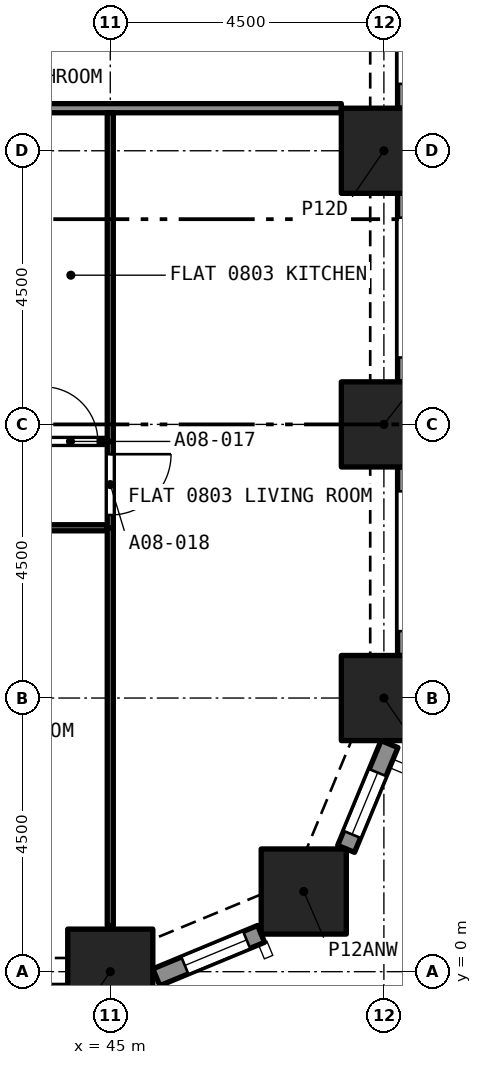
"""IFC4 building model, lengths in metres.
Left out: names, types, materials, properties, quantities, classifications, styles, units other than length and angle.
Written with IfcOpenShell. Run it as: python <this file> out.ifc"""

import sys

from ifc_helpers import new_model, si_unit, direction, frame, frame_2d, origin, origin_2d, place, context, subcontext, project, spatial, rectangle, extrude, element, fill, save


model = new_model("IFC4")
c1 = context("Model", 3, precision=1e-05, world=origin(), true_north=direction((0.0, 1.0)))
c2 = subcontext(c1, "Body", "Model", "MODEL_VIEW")
j1 = project(units=[si_unit("LENGTHUNIT", "METRE"), si_unit("PLANEANGLEUNIT", "RADIAN")], contexts=[c1])
p1 = place(None, origin())
s1 = spatial("IfcSite", under=j1, at=p1, CompositionType="ELEMENT")
p2 = place(p1, origin())
s2 = spatial("IfcBuilding", under=s1, at=p2, CompositionType="ELEMENT")
p3 = place(p2, frame((0.0, 0.0, 36.8)))
s3 = spatial("IfcBuildingStorey", under=s2, at=p3, CompositionType="ELEMENT", Elevation=36.8)
for number, where, z_axis, x_axis in (
    (1, (45.0, 0.0, 0.0), (0.0, 0.0, 1.0), (1.0, 0.0, 0.0)),
    (2, (48.182, 1.318, 0.0), (0.0, 0.0, 1.0), (1.0, 0.0, 0.0)),
    (3, (49.5, 4.5, 0.0), (0.0, 0.0, 1.0), (1.0, 0.0, 0.0)),
    (4, (49.5, 9.0, 0.0), (0.0, 0.0, 1.0), (1.0, 0.0, 0.0)),
    (5, (49.5, 13.5, 0.0), (0.0, 0.0, 1.0), (1.0, 0.0, 0.0)),
):
    element("IfcColumn", number, at=place(p3, frame(where, z_axis=z_axis, x_axis=x_axis)), inside=s3, PredefinedType="COLUMN", context=c2, shape_type="SweptSolid", body=[
        extrude(rectangle(XDim=1.4, YDim=1.4, at=origin_2d()), origin(), (0.0, 0.0, 1.0), 3.2),
    ])
p4 = place(p3, frame((47.48, 0.622, 0.0), z_axis=(0.0, 0.0, 1.0), x_axis=(-0.923903565336, -0.38262540684, 0.0)))
e6 = element("IfcWall", 6, at=p4, inside=s3, PredefinedType="SOLIDWALL", context=c2, shape_type="SweptSolid", body=[
    extrude(rectangle(XDim=1.865, YDim=0.3, at=frame_2d((0.933, 0.0))), origin(), (0.0, 0.0, 1.0), 3.2),
])
p5 = place(p4, frame((0.258, 0.0, 0.45)))
e7 = element("IfcOpeningElement", 7, at=p5, cuts=e6, PredefinedType="OPENING", context=c2, shape_type="SweptSolid", body=[
    extrude(rectangle(XDim=1.1, YDim=1.95, at=frame_2d((0.55, 0.975))), frame((0.0, 0.16, 0.0), z_axis=(0.0, -1.0, 0.0), x_axis=(1.0, 0.0, 0.0)), (0.0, 0.0, 1.0), 0.32),
])
p6 = place(p3, frame((49.592, 3.743, 0.0), z_axis=(0.0, 0.0, 1.0), x_axis=(-0.382737135771, -0.923857286003, 0.0)))
e8 = element("IfcWall", 8, at=p6, inside=s3, PredefinedType="SOLIDWALL", context=c2, shape_type="SweptSolid", body=[
    extrude(rectangle(XDim=1.865, YDim=0.3, at=frame_2d((0.933, 0.0))), origin(), (0.0, 0.0, 1.0), 3.2),
])
p7 = place(p6, frame((0.508, 0.0, 0.45)))
e9 = element("IfcOpeningElement", 9, at=p7, cuts=e8, PredefinedType="OPENING", context=c2, shape_type="SweptSolid", body=[
    extrude(rectangle(XDim=1.1, YDim=1.95, at=frame_2d((0.55, 0.975))), frame((0.0, 0.16, 0.0), z_axis=(0.0, -1.0, 0.0), x_axis=(1.0, 0.0, 0.0)), (0.0, 0.0, 1.0), 0.32),
])
p8 = place(p3, frame((49.875, 8.3, 0.0), z_axis=(0.0, 0.0, 1.0), x_axis=(0.0, -1.0, 0.0)))
e10 = element("IfcWall", 10, at=p8, inside=s3, PredefinedType="SOLIDWALL", context=c2, shape_type="SweptSolid", body=[
    extrude(rectangle(XDim=3.1, YDim=0.3, at=frame_2d((1.55, 0.0))), origin(), (0.0, 0.0, 1.0), 3.2),
])
p9 = place(p8, frame((0.4, 0.0, 0.45)))
e11 = element("IfcOpeningElement", 11, at=p9, cuts=e10, PredefinedType="OPENING", context=c2, shape_type="SweptSolid", body=[
    extrude(rectangle(XDim=2.3, YDim=1.95, at=frame_2d((1.15, 0.975))), frame((0.0, 0.16, 0.0), z_axis=(0.0, -1.0, 0.0), x_axis=(1.0, 0.0, 0.0)), (0.0, 0.0, 1.0), 0.32),
])
p10 = place(p3, frame((49.875, 12.8, 0.0), z_axis=(0.0, 0.0, 1.0), x_axis=(0.0, -1.0, 0.0)))
e12 = element("IfcWall", 12, at=p10, inside=s3, PredefinedType="SOLIDWALL", context=c2, shape_type="SweptSolid", body=[
    extrude(rectangle(XDim=3.1, YDim=0.3, at=frame_2d((1.55, 0.0))), origin(), (0.0, 0.0, 1.0), 3.2),
])
p11 = place(p10, frame((0.4, 0.0, 0.45)))
e13 = element("IfcOpeningElement", 13, at=p11, cuts=e12, PredefinedType="OPENING", context=c2, shape_type="SweptSolid", body=[
    extrude(rectangle(XDim=2.3, YDim=1.95, at=frame_2d((1.15, 0.975))), frame((0.0, 0.16, 0.0), z_axis=(0.0, -1.0, 0.0), x_axis=(1.0, 0.0, 0.0)), (0.0, 0.0, 1.0), 0.32),
])
p12 = place(p3, frame((49.875, 17.3, 0.0), z_axis=(0.0, 0.0, 1.0), x_axis=(0.0, -1.0, 0.0)))
e14 = element("IfcWall", 14, at=p12, inside=s3, PredefinedType="SOLIDWALL", context=c2, shape_type="SweptSolid", body=[
    extrude(rectangle(XDim=3.1, YDim=0.3, at=frame_2d((1.55, 0.0))), origin(), (0.0, 0.0, 1.0), 3.2),
])
p13 = place(p12, frame((0.4, 0.0, 0.45)))
e15 = element("IfcOpeningElement", 15, at=p13, cuts=e14, PredefinedType="OPENING", context=c2, shape_type="SweptSolid", body=[
    extrude(rectangle(XDim=2.3, YDim=1.95, at=frame_2d((1.15, 0.975))), frame((0.0, 0.16, 0.0), z_axis=(0.0, -1.0, 0.0), x_axis=(1.0, 0.0, 0.0)), (0.0, 0.0, 1.0), 0.32),
])
p14 = place(p3, frame((42.6, 14.2, 0.0), z_axis=(0.0, 0.0, 1.0), x_axis=(1.0, 0.0, 0.0)))
e16 = element("IfcWall", 16, at=p14, inside=s3, PredefinedType="PARTITIONING", context=c2, shape_type="SweptSolid", body=[
    extrude(rectangle(XDim=6.2, YDim=0.15, at=frame_2d((3.1, 0.0))), origin(), (0.0, 0.0, 1.0), 2.9),
])
p15 = place(p3, frame((44.95, 7.3, 0.0), z_axis=(0.0, 0.0, 1.0), x_axis=(-1.0, 0.0, 0.0)))
e17 = element("IfcWall", 17, at=p15, inside=s3, PredefinedType="PARTITIONING", context=c2, shape_type="SweptSolid", body=[
    extrude(rectangle(XDim=4.35, YDim=0.1, at=frame_2d((2.175, 0.0))), origin(), (0.0, 0.0, 1.0), 2.9),
])
p16 = place(p15, frame((1.75, 0.0, 0.0)))
e18 = element("IfcOpeningElement", 18, at=p16, cuts=e17, PredefinedType="OPENING", context=c2, shape_type="SweptSolid", body=[
    extrude(rectangle(XDim=0.9, YDim=2.1, at=frame_2d((0.45, 1.05))), frame((0.0, 0.06, 0.0), z_axis=(0.0, -1.0, 0.0), x_axis=(1.0, 0.0, 0.0)), (0.0, 0.0, 1.0), 0.12),
])
p17 = place(p3, frame((45.0, 0.758, 0.0), z_axis=(0.0, 0.0, 1.0), x_axis=(0.0, 1.0, 0.0)))
e19 = element("IfcWall", 19, at=p17, inside=s3, PredefinedType="PARTITIONING", context=c2, shape_type="SweptSolid", body=[
    extrude(rectangle(XDim=6.542, YDim=0.1, at=frame_2d((3.271, 0.0))), origin(), (0.0, 0.0, 1.0), 2.9),
])
p18 = place(p3, frame((43.691, 8.72, 0.0), z_axis=(0.0, 0.0, 1.0), x_axis=(1.0, 0.0, 0.0)))
e20 = element("IfcWall", 20, at=p18, inside=s3, PredefinedType="PARTITIONING", context=c2, shape_type="SweptSolid", body=[
    extrude(rectangle(XDim=1.259, YDim=0.1, at=frame_2d((0.629, 0.0))), origin(), (0.0, 0.0, 1.0), 2.9),
])
p19 = place(p18, frame((0.205, 0.0, 0.0)))
e21 = element("IfcOpeningElement", 21, at=p19, cuts=e20, PredefinedType="OPENING", context=c2, shape_type="SweptSolid", body=[
    extrude(rectangle(XDim=0.9, YDim=2.1, at=frame_2d((0.45, 1.05))), frame((0.0, 0.06, 0.0), z_axis=(0.0, -1.0, 0.0), x_axis=(1.0, 0.0, 0.0)), (0.0, 0.0, 1.0), 0.12),
])
p20 = place(p3, frame((45.0, 8.72, 0.0), z_axis=(0.0, 0.0, 1.0), x_axis=(0.0, -1.0, 0.0)))
e22 = element("IfcWall", 22, at=p20, inside=s3, PredefinedType="PARTITIONING", context=c2, shape_type="SweptSolid", body=[
    extrude(rectangle(XDim=1.42, YDim=0.1, at=frame_2d((0.71, 0.0))), origin(), (0.0, 0.0, 1.0), 2.9),
])
p21 = place(p20, frame((0.21, 0.0, 0.0)))
e23 = element("IfcOpeningElement", 23, at=p21, cuts=e22, PredefinedType="OPENING", context=c2, shape_type="SweptSolid", body=[
    extrude(rectangle(XDim=1.0, YDim=2.1, at=frame_2d((0.5, 1.05))), frame((0.0, 0.06, 0.0), z_axis=(0.0, -1.0, 0.0), x_axis=(1.0, 0.0, 0.0)), (0.0, 0.0, 1.0), 0.12),
])
p22 = place(p3, frame((45.0, 8.72, 0.0), z_axis=(0.0, 0.0, 1.0), x_axis=(0.0, 1.0, 0.0)))
e24 = element("IfcWall", 24, at=p22, inside=s3, PredefinedType="PARTITIONING", context=c2, shape_type="SweptSolid", body=[
    extrude(rectangle(XDim=5.405, YDim=0.1, at=frame_2d((2.703, 0.0))), origin(), (0.0, 0.0, 1.0), 2.9),
])
p23 = place(p5, origin())
e25 = element("IfcWindow", 25, at=p23, inside=s3, PartitioningType="SINGLE_PANEL", PredefinedType="WINDOW", context=c2, shape_type="SweptSolid", body=[
    extrude(rectangle(XDim=1.1, YDim=1.95, at=frame_2d((0.55, 0.975))), frame((0.0, 0.03, 0.0), z_axis=(0.0, -1.0, 0.0), x_axis=(1.0, 0.0, 0.0)), (0.0, 0.0, 1.0), 0.06),
])
fill(e7, e25)
p24 = place(p7, origin())
e26 = element("IfcWindow", 26, at=p24, inside=s3, PartitioningType="SINGLE_PANEL", PredefinedType="WINDOW", context=c2, shape_type="SweptSolid", body=[
    extrude(rectangle(XDim=1.1, YDim=1.95, at=frame_2d((0.55, 0.975))), frame((0.0, 0.03, 0.0), z_axis=(0.0, -1.0, 0.0), x_axis=(1.0, 0.0, 0.0)), (0.0, 0.0, 1.0), 0.06),
])
fill(e9, e26)
p25 = place(p19, origin())
e27 = element("IfcDoor", 27, at=p25, inside=s3, OperationType="SINGLE_SWING_RIGHT", PredefinedType="DOOR", context=c2, shape_type="SweptSolid", body=[
    extrude(rectangle(XDim=0.9, YDim=2.1, at=frame_2d((0.45, 1.05))), frame((0.0, 0.025, 0.0), z_axis=(0.0, -1.0, 0.0), x_axis=(1.0, 0.0, 0.0)), (0.0, 0.0, 1.0), 0.05),
])
fill(e21, e27)
p26 = place(p21, origin())
e28 = element("IfcDoor", 28, at=p26, inside=s3, OperationType="SINGLE_SWING_RIGHT", PredefinedType="DOOR", context=c2, shape_type="SweptSolid", body=[
    extrude(rectangle(XDim=1.0, YDim=2.1, at=frame_2d((0.5, 1.05))), frame((0.0, 0.025, 0.0), z_axis=(0.0, -1.0, 0.0), x_axis=(1.0, 0.0, 0.0)), (0.0, 0.0, 1.0), 0.05),
])
fill(e23, e28)
save(model, sys.argv[1])
